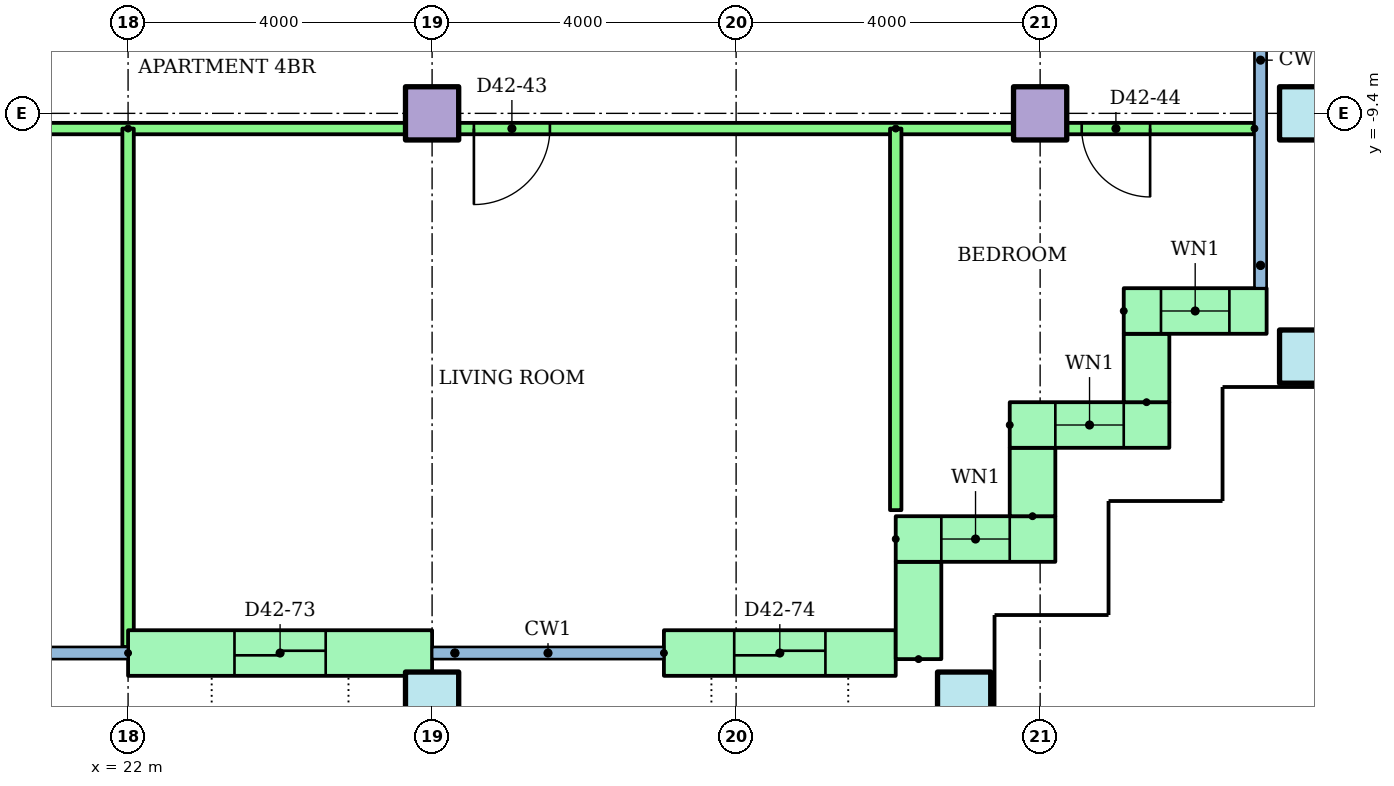
"""IFC4 building model, lengths in metres.
Left out: names, types, materials, properties, quantities, classifications, styles, units other than length and angle.
Written with IfcOpenShell. Run it as: python <this file> out.ifc"""

import sys

from ifc_helpers import new_model, si_unit, direction, frame, frame_2d, origin, origin_2d, place, context, subcontext, project, spatial, rectangle, hollow_rectangle, extrude, element, fill, save


model = new_model("IFC4")
c1 = context("Model", 3, precision=1e-05, world=origin(), true_north=direction((0.0, 1.0)))
c2 = subcontext(c1, "Body", "Model", "MODEL_VIEW")
j1 = project(units=[si_unit("LENGTHUNIT", "METRE"), si_unit("PLANEANGLEUNIT", "RADIAN")], contexts=[c1])
p1 = place(None, origin())
s1 = spatial("IfcSite", under=j1, at=p1, CompositionType="ELEMENT")
p2 = place(p1, origin())
s2 = spatial("IfcBuilding", under=s1, at=p2, CompositionType="ELEMENT")
p3 = place(p2, frame((0.0, 0.0, 165.3)))
s3 = spatial("IfcBuildingStorey", under=s2, at=p3, CompositionType="ELEMENT", Elevation=165.3)
for number, where in (
    (1, (26.0, -17.1, 0.0)),
    (2, (33.0, -17.1, 0.0)),
    (3, (37.5, -12.6, 0.0)),
):
    element("IfcColumn", number, at=place(p3, frame(where)), inside=s3, PredefinedType="COLUMN", context=c2, shape_type="SweptSolid", body=[
        extrude(hollow_rectangle(XDim=0.7, YDim=0.7, WallThickness=0.036, at=origin_2d()), origin(), (0.0, 0.0, 1.0), 3.2),
    ])
for number, where in (
    (4, (26.0, -9.4, 0.0)),
    (5, (34.0, -9.4, 0.0)),
):
    element("IfcColumn", number, at=place(p3, frame(where)), inside=s3, PredefinedType="COLUMN", context=c2, shape_type="SweptSolid", body=[
        extrude(rectangle(XDim=0.7, YDim=0.7, at=origin_2d()), origin(), (0.0, 0.0, 1.0), 3.2),
    ])
p4 = place(p3, frame((37.5, -9.4, 0.0)))
e6 = element("IfcColumn", 6, at=p4, inside=s3, PredefinedType="COLUMN", context=c2, shape_type="SweptSolid", body=[
    extrude(hollow_rectangle(XDim=0.7, YDim=0.7, WallThickness=0.036, at=origin_2d()), origin(), (0.0, 0.0, 1.0), 3.2),
])
p5 = place(p3, frame((22.0, -16.5, 0.0)))
e7 = element("IfcWall", 7, at=p5, inside=s3, PredefinedType="STANDARD", context=c2, shape_type="SweptSolid", body=[
    extrude(rectangle(XDim=4.0, YDim=0.6, at=frame_2d((2.0, 0.0))), origin(), (0.0, 0.0, 1.0), 2.92),
])
p6 = place(p5, frame((1.4, 0.0, 0.0)))
e8 = element("IfcOpeningElement", 8, at=p6, cuts=e7, PredefinedType="OPENING", context=c2, shape_type="SweptSolid", body=[
    extrude(rectangle(XDim=1.2, YDim=2.1, at=frame_2d((0.6, 1.05))), frame((0.0, 0.31, 0.0), z_axis=(0.0, -1.0, 0.0), x_axis=(1.0, 0.0, 0.0)), (0.0, 0.0, 1.0), 0.62),
])
p7 = place(p3, frame((29.05, -16.5, 0.0)))
e9 = element("IfcWall", 9, at=p7, inside=s3, PredefinedType="STANDARD", context=c2, shape_type="SweptSolid", body=[
    extrude(rectangle(XDim=3.05, YDim=0.6, at=frame_2d((1.525, 0.0))), origin(), (0.0, 0.0, 1.0), 2.92),
])
p8 = place(p7, frame((0.925, 0.0, 0.0)))
e10 = element("IfcOpeningElement", 10, at=p8, cuts=e9, PredefinedType="OPENING", context=c2, shape_type="SweptSolid", body=[
    extrude(rectangle(XDim=1.2, YDim=2.1, at=frame_2d((0.6, 1.05))), frame((0.0, 0.31, 0.0), z_axis=(0.0, -1.0, 0.0), x_axis=(1.0, 0.0, 0.0)), (0.0, 0.0, 1.0), 0.62),
])
p9 = place(p3, frame((32.4, -16.58, 0.0), z_axis=(0.0, 0.0, 1.0), x_axis=(0.0, 1.0, 0.0)))
e11 = element("IfcWall", 11, at=p9, inside=s3, PredefinedType="STANDARD", context=c2, shape_type="SweptSolid", body=[
    extrude(rectangle(XDim=1.28, YDim=0.6, at=frame_2d((0.64, 0.0))), origin(), (0.0, 0.0, 1.0), 2.92),
])
p10 = place(p3, frame((32.1, -15.0, 0.0)))
e12 = element("IfcWall", 12, at=p10, inside=s3, PredefinedType="STANDARD", context=c2, shape_type="SweptSolid", body=[
    extrude(rectangle(XDim=2.1, YDim=0.6, at=frame_2d((1.05, 0.0))), origin(), (0.0, 0.0, 1.0), 2.92),
])
p11 = place(p10, frame((0.6, 0.0, 0.9)))
e13 = element("IfcOpeningElement", 13, at=p11, cuts=e12, PredefinedType="OPENING", context=c2, shape_type="SweptSolid", body=[
    extrude(rectangle(XDim=0.9, YDim=1.5, at=frame_2d((0.45, 0.75))), frame((0.0, 0.31, 0.0), z_axis=(0.0, -1.0, 0.0), x_axis=(1.0, 0.0, 0.0)), (0.0, 0.0, 1.0), 0.62),
])
p12 = place(p3, frame((33.9, -14.7, 0.0), z_axis=(0.0, 0.0, 1.0), x_axis=(0.0, 1.0, 0.0)))
e14 = element("IfcWall", 14, at=p12, inside=s3, PredefinedType="STANDARD", context=c2, shape_type="SweptSolid", body=[
    extrude(rectangle(XDim=0.9, YDim=0.6, at=frame_2d((0.45, 0.0))), origin(), (0.0, 0.0, 1.0), 2.92),
])
p13 = place(p3, frame((33.6, -13.5, 0.0)))
e15 = element("IfcWall", 15, at=p13, inside=s3, PredefinedType="STANDARD", context=c2, shape_type="SweptSolid", body=[
    extrude(rectangle(XDim=2.1, YDim=0.6, at=frame_2d((1.05, 0.0))), origin(), (0.0, 0.0, 1.0), 2.92),
])
p14 = place(p13, frame((0.6, 0.0, 0.9)))
e16 = element("IfcOpeningElement", 16, at=p14, cuts=e15, PredefinedType="OPENING", context=c2, shape_type="SweptSolid", body=[
    extrude(rectangle(XDim=0.9, YDim=1.5, at=frame_2d((0.45, 0.75))), frame((0.0, 0.31, 0.0), z_axis=(0.0, -1.0, 0.0), x_axis=(1.0, 0.0, 0.0)), (0.0, 0.0, 1.0), 0.62),
])
p15 = place(p3, frame((35.4, -13.2, 0.0), z_axis=(0.0, 0.0, 1.0), x_axis=(0.0, 1.0, 0.0)))
e17 = element("IfcWall", 17, at=p15, inside=s3, PredefinedType="STANDARD", context=c2, shape_type="SweptSolid", body=[
    extrude(rectangle(XDim=0.9, YDim=0.6, at=frame_2d((0.45, 0.0))), origin(), (0.0, 0.0, 1.0), 2.92),
])
p16 = place(p3, frame((35.1, -12.0, 0.0)))
e18 = element("IfcWall", 18, at=p16, inside=s3, PredefinedType="STANDARD", context=c2, shape_type="SweptSolid", body=[
    extrude(rectangle(XDim=1.88, YDim=0.6, at=frame_2d((0.94, 0.0))), origin(), (0.0, 0.0, 1.0), 2.92),
])
p17 = place(p16, frame((0.49, 0.0, 0.9)))
e19 = element("IfcOpeningElement", 19, at=p17, cuts=e18, PredefinedType="OPENING", context=c2, shape_type="SweptSolid", body=[
    extrude(rectangle(XDim=0.9, YDim=1.5, at=frame_2d((0.45, 0.75))), frame((0.0, 0.31, 0.0), z_axis=(0.0, -1.0, 0.0), x_axis=(1.0, 0.0, 0.0)), (0.0, 0.0, 1.0), 0.62),
])
p18 = place(p3, frame((36.82, -9.6, 0.0), z_axis=(0.0, 0.0, 1.0), x_axis=(-1.0, 0.0, 0.0)))
e20 = element("IfcWall", 20, at=p18, inside=s3, PredefinedType="PARTITIONING", context=c2, shape_type="SweptSolid", body=[
    extrude(rectangle(XDim=26.82, YDim=0.15, at=frame_2d((13.41, 0.0))), origin(), (0.0, 0.0, 1.0), 2.4),
])
p19 = place(p18, frame((24.37, 0.0, 0.0)))
e21 = element("IfcOpeningElement", 21, at=p19, cuts=e20, PredefinedType="OPENING", context=c2, shape_type="SweptSolid", body=[
    extrude(rectangle(XDim=0.9, YDim=2.1, at=frame_2d((0.45, 1.05))), frame((0.0, 0.085, 0.0), z_axis=(0.0, -1.0, 0.0), x_axis=(1.0, 0.0, 0.0)), (0.0, 0.0, 1.0), 0.17),
])
p20 = place(p18, frame((20.37, 0.0, 0.0)))
e22 = element("IfcOpeningElement", 22, at=p20, cuts=e20, PredefinedType="OPENING", context=c2, shape_type="SweptSolid", body=[
    extrude(rectangle(XDim=0.9, YDim=2.1, at=frame_2d((0.45, 1.05))), frame((0.0, 0.085, 0.0), z_axis=(0.0, -1.0, 0.0), x_axis=(1.0, 0.0, 0.0)), (0.0, 0.0, 1.0), 0.17),
])
p21 = place(p18, frame((16.37, 0.0, 0.0)))
e23 = element("IfcOpeningElement", 23, at=p21, cuts=e20, PredefinedType="OPENING", context=c2, shape_type="SweptSolid", body=[
    extrude(rectangle(XDim=0.9, YDim=2.1, at=frame_2d((0.45, 1.05))), frame((0.0, 0.085, 0.0), z_axis=(0.0, -1.0, 0.0), x_axis=(1.0, 0.0, 0.0)), (0.0, 0.0, 1.0), 0.17),
])
p22 = place(p18, frame((9.27, 0.0, 0.0)))
e24 = element("IfcOpeningElement", 24, at=p22, cuts=e20, PredefinedType="OPENING", context=c2, shape_type="SweptSolid", body=[
    extrude(rectangle(XDim=1.0, YDim=2.1, at=frame_2d((0.5, 1.05))), frame((0.0, 0.085, 0.0), z_axis=(0.0, -1.0, 0.0), x_axis=(1.0, 0.0, 0.0)), (0.0, 0.0, 1.0), 0.17),
])
p23 = place(p18, frame((1.373, 0.0, 0.0)))
e25 = element("IfcOpeningElement", 25, at=p23, cuts=e20, PredefinedType="OPENING", context=c2, shape_type="SweptSolid", body=[
    extrude(rectangle(XDim=0.9, YDim=2.1, at=frame_2d((0.45, 1.05))), frame((0.0, 0.085, 0.0), z_axis=(0.0, -1.0, 0.0), x_axis=(1.0, 0.0, 0.0)), (0.0, 0.0, 1.0), 0.17),
])
p24 = place(p3, frame((22.0, -9.6, 0.0), z_axis=(0.0, 0.0, 1.0), x_axis=(0.0, -1.0, 0.0)))
e26 = element("IfcWall", 26, at=p24, inside=s3, PredefinedType="PARTITIONING", context=c2, shape_type="SweptSolid", body=[
    extrude(rectangle(XDim=6.821, YDim=0.15, at=frame_2d((3.41, 0.0))), origin(), (0.0, 0.0, 1.0), 2.4),
])
p25 = place(p3, frame((32.1, -9.6, 0.0), z_axis=(0.0, 0.0, 1.0), x_axis=(0.0, -1.0, 0.0)))
e27 = element("IfcWall", 27, at=p25, inside=s3, PredefinedType="PARTITIONING", context=c2, shape_type="SweptSolid", body=[
    extrude(rectangle(XDim=5.02, YDim=0.15, at=frame_2d((2.51, 0.0))), origin(), (0.0, 0.0, 1.0), 2.4),
])
p26 = place(p11, origin())
e28 = element("IfcWindow", 28, at=p26, inside=s3, PartitioningType="SINGLE_PANEL", PredefinedType="WINDOW", context=c2, shape_type="SweptSolid", body=[
    extrude(rectangle(XDim=0.9, YDim=1.5, at=frame_2d((0.45, 0.75))), frame((0.0, 0.03, 0.0), z_axis=(0.0, -1.0, 0.0), x_axis=(1.0, 0.0, 0.0)), (0.0, 0.0, 1.0), 0.06),
])
fill(e13, e28)
p27 = place(p14, origin())
e29 = element("IfcWindow", 29, at=p27, inside=s3, PartitioningType="SINGLE_PANEL", PredefinedType="WINDOW", context=c2, shape_type="SweptSolid", body=[
    extrude(rectangle(XDim=0.9, YDim=1.5, at=frame_2d((0.45, 0.75))), frame((0.0, 0.03, 0.0), z_axis=(0.0, -1.0, 0.0), x_axis=(1.0, 0.0, 0.0)), (0.0, 0.0, 1.0), 0.06),
])
fill(e16, e29)
p28 = place(p17, origin())
e30 = element("IfcWindow", 30, at=p28, inside=s3, PartitioningType="SINGLE_PANEL", PredefinedType="WINDOW", context=c2, shape_type="SweptSolid", body=[
    extrude(rectangle(XDim=0.9, YDim=1.5, at=frame_2d((0.45, 0.75))), frame((0.0, 0.03, 0.0), z_axis=(0.0, -1.0, 0.0), x_axis=(1.0, 0.0, 0.0)), (0.0, 0.0, 1.0), 0.06),
])
fill(e19, e30)
p29 = place(p22, origin())
e31 = element("IfcDoor", 31, at=p29, inside=s3, OperationType="SINGLE_SWING_RIGHT", PredefinedType="DOOR", context=c2, shape_type="SweptSolid", body=[
    extrude(rectangle(XDim=1.0, YDim=2.1, at=frame_2d((0.5, 1.05))), frame((0.0, 0.025, 0.0), z_axis=(0.0, -1.0, 0.0), x_axis=(1.0, 0.0, 0.0)), (0.0, 0.0, 1.0), 0.05),
])
fill(e24, e31)
p30 = place(p23, origin())
e32 = element("IfcDoor", 32, at=p30, inside=s3, OperationType="SINGLE_SWING_LEFT", PredefinedType="DOOR", context=c2, shape_type="SweptSolid", body=[
    extrude(rectangle(XDim=0.9, YDim=2.1, at=frame_2d((0.45, 1.05))), frame((0.0, 0.025, 0.0), z_axis=(0.0, -1.0, 0.0), x_axis=(1.0, 0.0, 0.0)), (0.0, 0.0, 1.0), 0.05),
])
fill(e25, e32)
p31 = place(p6, origin())
e33 = element("IfcDoor", 33, at=p31, inside=s3, OperationType="SLIDING_TO_LEFT", PredefinedType="DOOR", context=c2, shape_type="SweptSolid", body=[
    extrude(rectangle(XDim=1.2, YDim=2.1, at=frame_2d((0.6, 1.05))), frame((0.0, 0.025, 0.0), z_axis=(0.0, -1.0, 0.0), x_axis=(1.0, 0.0, 0.0)), (0.0, 0.0, 1.0), 0.05),
])
fill(e8, e33)
p32 = place(p8, origin())
e34 = element("IfcDoor", 34, at=p32, inside=s3, OperationType="SLIDING_TO_LEFT", PredefinedType="DOOR", context=c2, shape_type="SweptSolid", body=[
    extrude(rectangle(XDim=1.2, YDim=2.1, at=frame_2d((0.6, 1.05))), frame((0.0, 0.025, 0.0), z_axis=(0.0, -1.0, 0.0), x_axis=(1.0, 0.0, 0.0)), (0.0, 0.0, 1.0), 0.05),
])
fill(e10, e34)
save(model, sys.argv[1])
